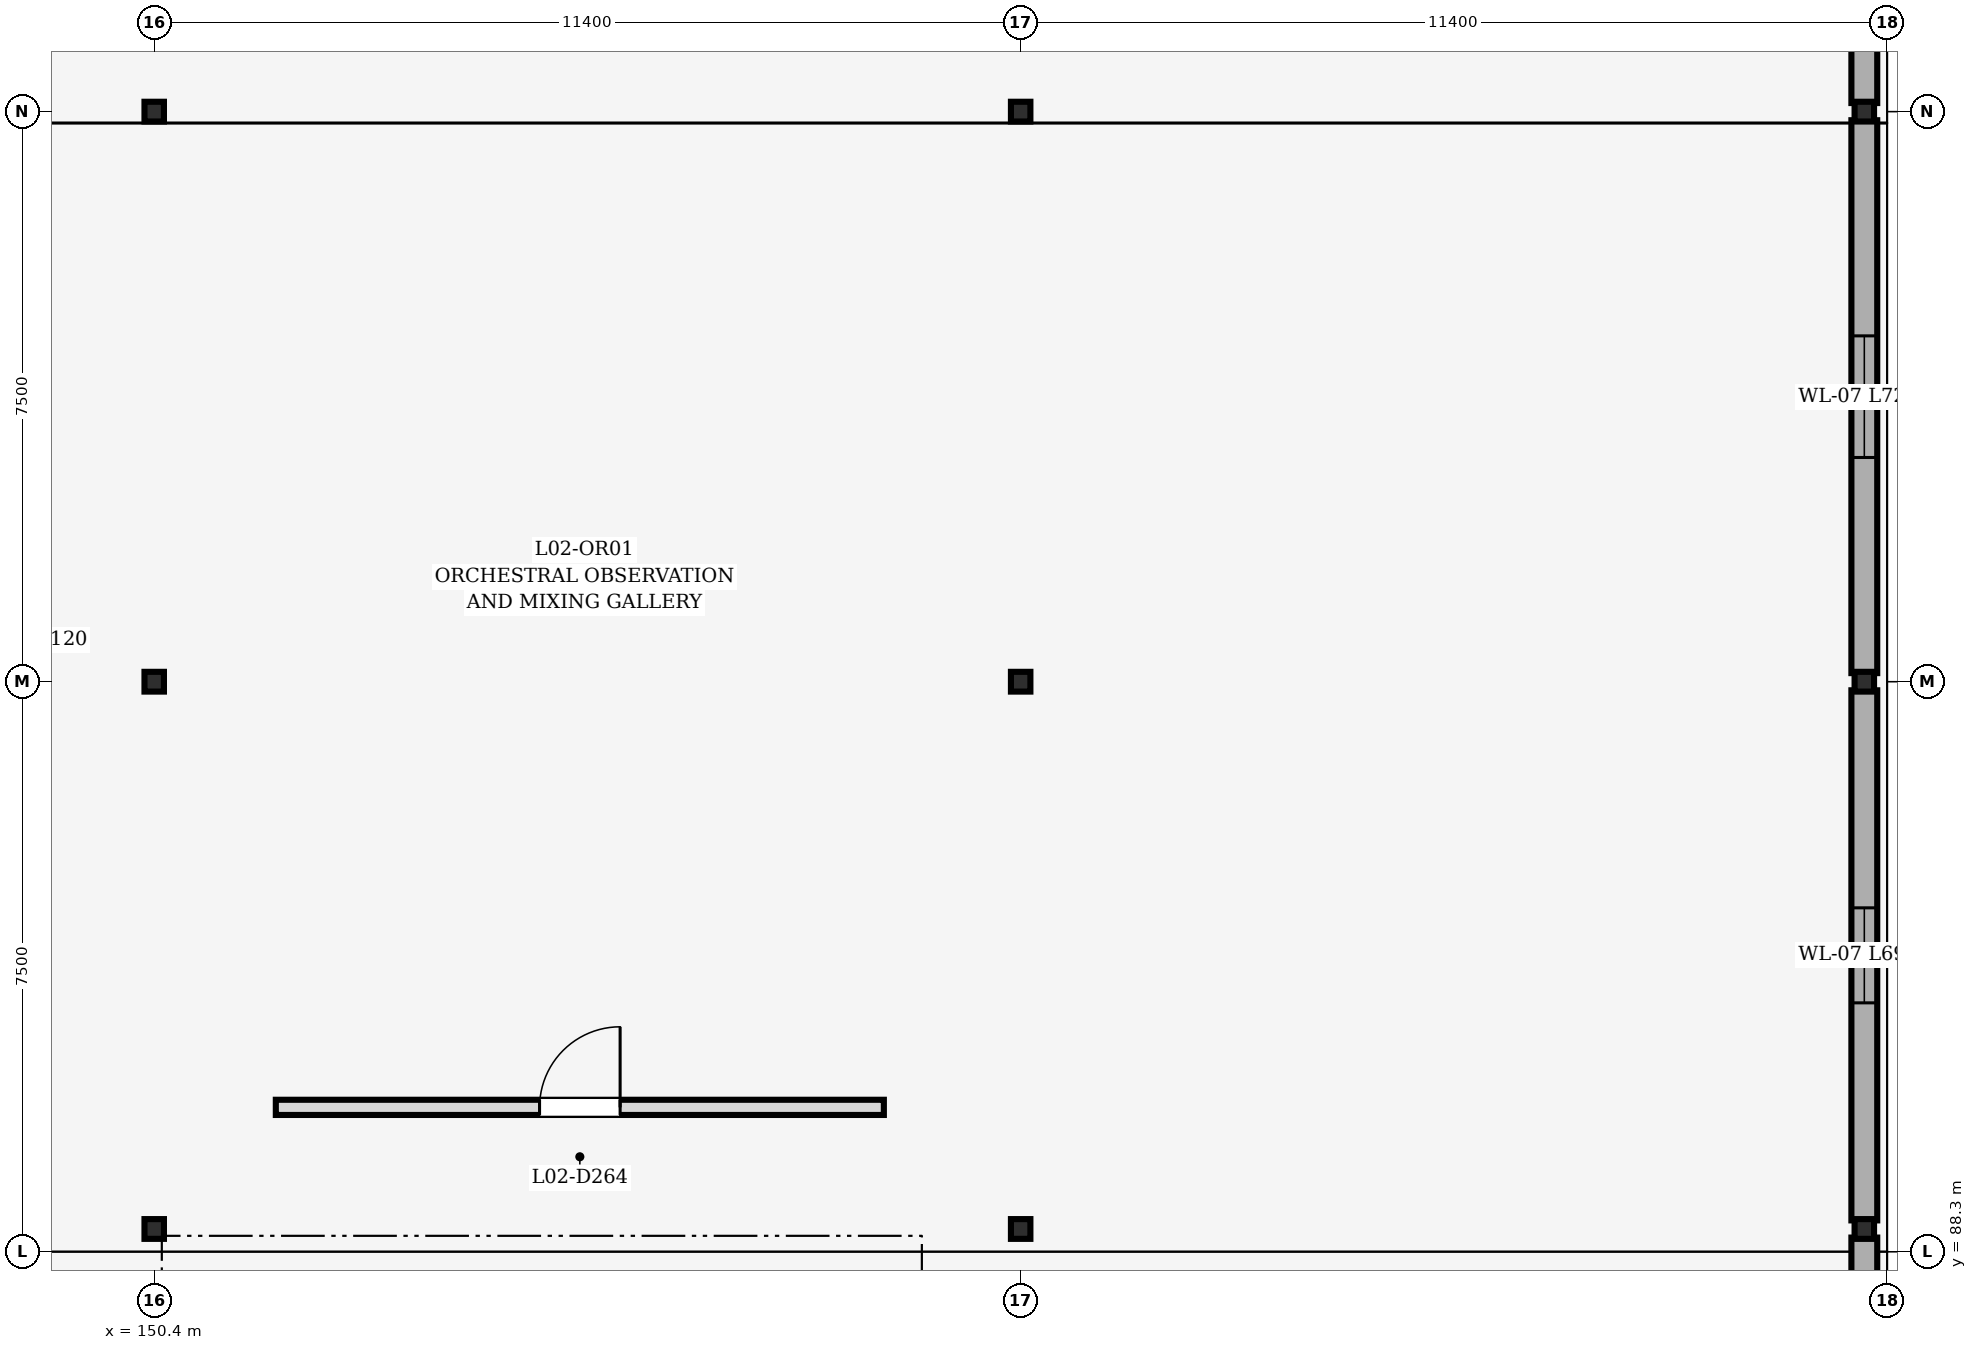
"""IFC4 building model, lengths in metres.
Left out: names, types, materials, properties, quantities, classifications, styles, units other than length and angle.
Written with IfcOpenShell. Run it as: python <this file> out.ifc"""

import sys

from ifc_helpers import new_model, si_unit, direction, frame, frame_2d, origin, origin_2d, place, context, subcontext, project, spatial, rectangle, i_section, extrude, element, fill, save


model = new_model("IFC4")
c1 = context("Model", 3, precision=1e-05, world=origin(), true_north=direction((0.0, 1.0)))
c2 = subcontext(c1, "Body", "Model", "MODEL_VIEW")
j1 = project(units=[si_unit("LENGTHUNIT", "METRE"), si_unit("PLANEANGLEUNIT", "RADIAN")], contexts=[c1])
p1 = place(None, origin())
s1 = spatial("IfcSite", under=j1, at=p1, CompositionType="ELEMENT")
p2 = place(p1, origin())
s2 = spatial("IfcBuilding", under=s1, at=p2, CompositionType="ELEMENT")
p3 = place(p2, frame((0.0, 0.0, 5.4)))
s3 = spatial("IfcBuildingStorey", under=s2, at=p3, CompositionType="ELEMENT", Elevation=5.4)
for number, where, z_axis, x_axis in (
    (1, (150.4, 88.6, 0.0), (0.0, 0.0, 1.0), (1.0, 0.0, 0.0)),
    (2, (150.4, 95.8, 0.0), (0.0, 0.0, 1.0), (1.0, 0.0, 0.0)),
    (3, (150.4, 103.3, 0.0), (0.0, 0.0, 1.0), (1.0, 0.0, 0.0)),
    (4, (161.8, 88.6, 0.0), (0.0, 0.0, 1.0), (1.0, 0.0, 0.0)),
    (5, (161.8, 95.8, 0.0), (0.0, 0.0, 1.0), (1.0, 0.0, 0.0)),
    (6, (161.8, 103.3, 0.0), (0.0, 0.0, 1.0), (1.0, 0.0, 0.0)),
    (7, (172.9, 88.6, 0.0), (0.0, 0.0, 1.0), (1.0, 0.0, 0.0)),
    (8, (172.9, 95.8, 0.0), (0.0, 0.0, 1.0), (1.0, 0.0, 0.0)),
    (9, (172.9, 103.3, 0.0), (0.0, 0.0, 1.0), (1.0, 0.0, 0.0)),
):
    element("IfcColumn", number, at=place(p3, frame(where, z_axis=z_axis, x_axis=x_axis)), inside=s3, PredefinedType="COLUMN", context=c2, shape_type="SweptSolid", body=[
        extrude(i_section(OverallWidth=0.256, OverallDepth=0.26, WebThickness=0.01, FlangeThickness=0.017, at=origin_2d()), origin(), (0.0, 0.0, 1.0), 4.8),
    ])
p4 = place(p3, frame((172.9, 95.687, 0.0), z_axis=(0.0, 0.0, 1.0), x_axis=(0.0, -1.0, 0.0)))
e10 = element("IfcWall", 10, at=p4, inside=s3, PredefinedType="STANDARD", context=c2, shape_type="SweptSolid", body=[
    extrude(rectangle(XDim=6.974, YDim=0.34, at=frame_2d((3.487, 0.0))), origin(), (0.0, 0.0, 1.0), 3.777),
])
p5 = place(p4, frame((2.862, 0.0, 0.85)))
e11 = element("IfcOpeningElement", 11, at=p5, cuts=e10, PredefinedType="OPENING", context=c2, shape_type="SweptSolid", body=[
    extrude(rectangle(XDim=1.25, YDim=2.2, at=frame_2d((0.625, 1.1))), frame((0.0, 0.182, 0.0), z_axis=(0.0, -1.0, 0.0), x_axis=(1.0, 0.0, 0.0)), (0.0, 0.0, 1.0), 0.364),
])
p6 = place(p3, frame((172.9, 103.187, 0.0), z_axis=(0.0, 0.0, 1.0), x_axis=(0.0, -1.0, 0.0)))
e12 = element("IfcWall", 12, at=p6, inside=s3, PredefinedType="STANDARD", context=c2, shape_type="SweptSolid", body=[
    extrude(rectangle(XDim=7.274, YDim=0.34, at=frame_2d((3.637, 0.0))), origin(), (0.0, 0.0, 1.0), 3.777),
])
p7 = place(p6, frame((2.837, 0.0, 0.85)))
e13 = element("IfcOpeningElement", 13, at=p7, cuts=e12, PredefinedType="OPENING", context=c2, shape_type="SweptSolid", body=[
    extrude(rectangle(XDim=1.6, YDim=2.2, at=frame_2d((0.8, 1.1))), frame((0.0, 0.182, 0.0), z_axis=(0.0, -1.0, 0.0), x_axis=(1.0, 0.0, 0.0)), (0.0, 0.0, 1.0), 0.364),
])
p8 = place(p3, frame((172.9, 110.387, 0.0), z_axis=(0.0, 0.0, 1.0), x_axis=(0.0, -1.0, 0.0)))
e14 = element("IfcWall", 14, at=p8, inside=s3, PredefinedType="STANDARD", context=c2, shape_type="SweptSolid", body=[
    extrude(rectangle(XDim=6.974, YDim=0.34, at=frame_2d((3.487, 0.0))), origin(), (0.0, 0.0, 1.0), 3.827),
])
p9 = place(p8, frame((3.012, 0.0, 0.85)))
e15 = element("IfcOpeningElement", 15, at=p9, cuts=e14, PredefinedType="OPENING", context=c2, shape_type="SweptSolid", body=[
    extrude(rectangle(XDim=0.95, YDim=1.95, at=frame_2d((0.475, 0.975))), frame((0.0, 0.182, 0.0), z_axis=(0.0, -1.0, 0.0), x_axis=(1.0, 0.0, 0.0)), (0.0, 0.0, 1.0), 0.364),
])
p10 = place(p3, frame((172.9, 88.487, 0.0), z_axis=(0.0, 0.0, 1.0), x_axis=(0.0, -1.0, 0.0)))
e16 = element("IfcWall", 16, at=p10, inside=s3, PredefinedType="STANDARD", context=c2, shape_type="SweptSolid", body=[
    extrude(rectangle(XDim=7.575, YDim=0.34, at=frame_2d((3.788, 0.0))), origin(), (0.0, 0.0, 1.0), 3.777),
])
p11 = place(p10, frame((3.167, 0.0, 0.85)))
e17 = element("IfcOpeningElement", 17, at=p11, cuts=e16, PredefinedType="OPENING", context=c2, shape_type="SweptSolid", body=[
    extrude(rectangle(XDim=1.24, YDim=1.75, at=frame_2d((0.62, 0.875))), frame((0.0, 0.182, 0.0), z_axis=(0.0, -1.0, 0.0), x_axis=(1.0, 0.0, 0.0)), (0.0, 0.0, 1.0), 0.364),
])
p12 = place(p3, frame((152.0, 90.2, 0.0), z_axis=(0.0, 0.0, 1.0), x_axis=(1.0, 0.0, 0.0)))
e18 = element("IfcWall", 18, at=p12, inside=s3, PredefinedType="PARTITIONING", context=c2, shape_type="SweptSolid", body=[
    extrude(rectangle(XDim=8.0, YDim=0.2, at=frame_2d((4.0, 0.0))), origin(), (0.0, 0.0, 1.0), 4.525),
])
p13 = place(p12, frame((3.47, 0.0, 0.0)))
e19 = element("IfcOpeningElement", 19, at=p13, cuts=e18, PredefinedType="OPENING", context=c2, shape_type="SweptSolid", body=[
    extrude(rectangle(XDim=1.06, YDim=2.24, at=frame_2d((0.53, 1.12))), frame((0.0, 0.112, 0.0), z_axis=(0.0, -1.0, 0.0), x_axis=(1.0, 0.0, 0.0)), (0.0, 0.0, 1.0), 0.224),
])
p14 = place(p5, origin())
e20 = element("IfcWindow", 20, at=p14, inside=s3, PartitioningType="DOUBLE_PANEL_VERTICAL", PredefinedType="WINDOW", context=c2, shape_type="SweptSolid", body=[
    extrude(rectangle(XDim=1.25, YDim=2.2, at=frame_2d((0.625, 1.1))), frame((0.0, 0.03, 0.0), z_axis=(0.0, -1.0, 0.0), x_axis=(1.0, 0.0, 0.0)), (0.0, 0.0, 1.0), 0.06),
])
fill(e11, e20)
p15 = place(p7, origin())
e21 = element("IfcWindow", 21, at=p15, inside=s3, PartitioningType="DOUBLE_PANEL_VERTICAL", PredefinedType="WINDOW", context=c2, shape_type="SweptSolid", body=[
    extrude(rectangle(XDim=1.6, YDim=2.2, at=frame_2d((0.8, 1.1))), frame((0.0, 0.03, 0.0), z_axis=(0.0, -1.0, 0.0), x_axis=(1.0, 0.0, 0.0)), (0.0, 0.0, 1.0), 0.06),
])
fill(e13, e21)
p16 = place(p13, origin())
e22 = element("IfcDoor", 22, at=p16, inside=s3, OperationType="SINGLE_SWING_RIGHT", PredefinedType="DOOR", context=c2, shape_type="SweptSolid", body=[
    extrude(rectangle(XDim=1.06, YDim=2.24, at=frame_2d((0.53, 1.12))), frame((0.0, 0.025, 0.0), z_axis=(0.0, -1.0, 0.0), x_axis=(1.0, 0.0, 0.0)), (0.0, 0.0, 1.0), 0.05),
])
fill(e19, e22)
save(model, sys.argv[1])
